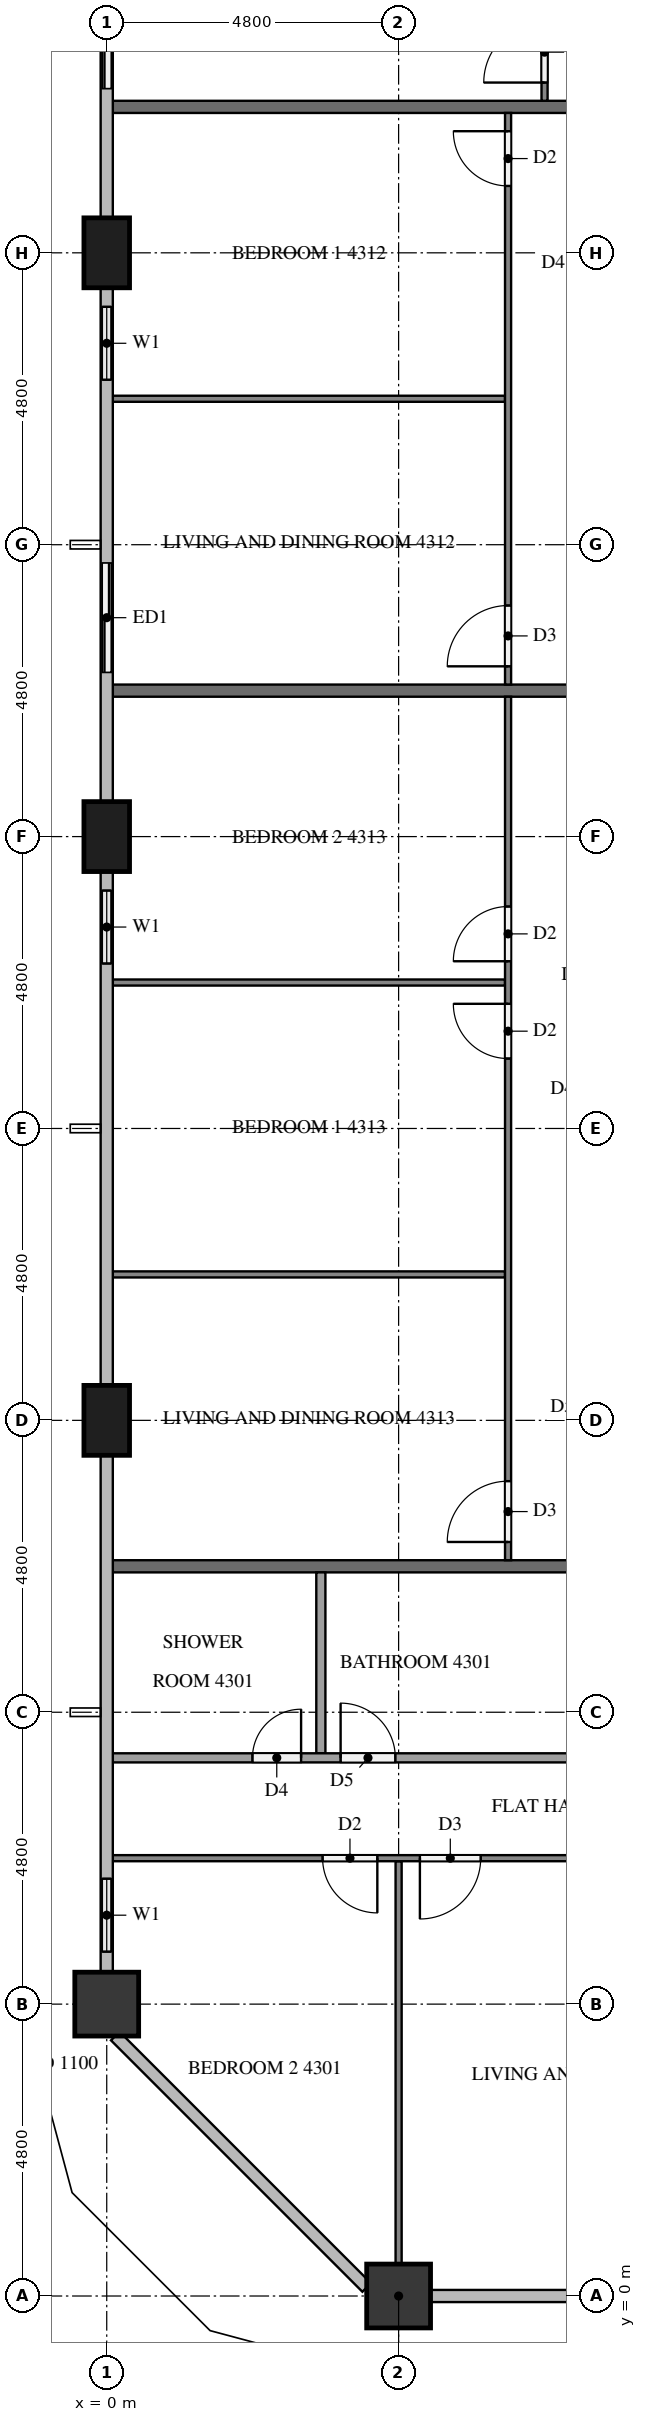
"""IFC4 building model, lengths in metres.
Left out: names, types, materials, properties, quantities, classifications, styles, units other than length and angle.
Written with IfcOpenShell. Run it as: python <this file> out.ifc"""

import sys

from ifc_helpers import new_model, si_unit, direction, frame, frame_2d, origin, origin_2d, place, context, subcontext, project, spatial, rectangle, extrude, element, fill, save


model = new_model("IFC4")
c1 = context("Model", 3, precision=1e-05, world=origin(), true_north=direction((0.0, 1.0)))
c2 = subcontext(c1, "Body", "Model", "MODEL_VIEW")
j1 = project(units=[si_unit("LENGTHUNIT", "METRE"), si_unit("PLANEANGLEUNIT", "RADIAN")], contexts=[c1])
p1 = place(None, origin())
s1 = spatial("IfcSite", under=j1, at=p1, CompositionType="ELEMENT")
p2 = place(p1, origin())
s2 = spatial("IfcBuilding", under=s1, at=p2, CompositionType="ELEMENT")
p3 = place(p2, frame((0.0, 0.0, 166.5)))
s3 = spatial("IfcBuildingStorey", under=s2, at=p3, CompositionType="ELEMENT", Elevation=166.5)
p4 = place(p3, frame((4.8, 0.0, 0.0), z_axis=(0.0, 0.0, 1.0), x_axis=(1.0, 0.0, 0.0)))
e1 = element("IfcColumn", 1, at=p4, inside=s3, PredefinedType="COLUMN", context=c2, shape_type="SweptSolid", body=[
    extrude(rectangle(XDim=1.05, YDim=1.05, at=origin_2d()), origin(), (0.0, 0.0, 1.0), 3.2),
])
for number, where, z_axis, x_axis in (
    (2, (0.0, 33.6, 0.0), (0.0, 0.0, 1.0), (0.0, 1.0, 0.0)),
    (3, (0.0, 24.0, 0.0), (0.0, 0.0, 1.0), (0.0, 1.0, 0.0)),
    (4, (0.0, 14.4, 0.0), (0.0, 0.0, 1.0), (0.0, 1.0, 0.0)),
):
    element("IfcColumn", number, at=place(p3, frame(where, z_axis=z_axis, x_axis=x_axis)), inside=s3, PredefinedType="COLUMN", context=c2, shape_type="SweptSolid", body=[
        extrude(rectangle(XDim=1.15, YDim=0.75, at=origin_2d()), origin(), (0.0, 0.0, 1.0), 3.2),
    ])
p5 = place(p3, frame((0.0, 4.8, 0.0), z_axis=(0.0, 0.0, 1.0), x_axis=(1.0, 0.0, 0.0)))
e5 = element("IfcColumn", 5, at=p5, inside=s3, PredefinedType="COLUMN", context=c2, shape_type="SweptSolid", body=[
    extrude(rectangle(XDim=1.05, YDim=1.05, at=origin_2d()), origin(), (0.0, 0.0, 1.0), 3.2),
])
p6 = place(p3, frame((0.0, 38.4, 0.0), z_axis=(0.0, 0.0, 1.0), x_axis=(0.0, -1.0, 0.0)))
e6 = element("IfcWall", 6, at=p6, inside=s3, PredefinedType="SOLIDWALL", context=c2, shape_type="SweptSolid", body=[
    extrude(rectangle(XDim=2.4, YDim=0.15, at=frame_2d((1.2, 0.0))), origin(), (0.0, 0.0, 1.0), 3.2),
])
p7 = place(p6, frame((0.3, 0.0, 0.0)))
e7 = element("IfcOpeningElement", 7, at=p7, cuts=e6, PredefinedType="OPENING", context=c2, shape_type="SweptSolid", body=[
    extrude(rectangle(XDim=1.8, YDim=2.4, at=frame_2d((0.9, 1.2))), frame((0.0, 0.085, 0.0), z_axis=(0.0, -1.0, 0.0), x_axis=(1.0, 0.0, 0.0)), (0.0, 0.0, 1.0), 0.17),
])
p8 = place(p3, frame((0.0, 33.025, 0.0), z_axis=(0.0, 0.0, 1.0), x_axis=(0.0, -1.0, 0.0)))
e8 = element("IfcWall", 8, at=p8, inside=s3, PredefinedType="SOLIDWALL", context=c2, shape_type="SweptSolid", body=[
    extrude(rectangle(XDim=1.825, YDim=0.15, at=frame_2d((0.913, 0.0))), origin(), (0.0, 0.0, 1.0), 3.2),
])
p9 = place(p8, frame((0.312, 0.0, 0.9)))
e9 = element("IfcOpeningElement", 9, at=p9, cuts=e8, PredefinedType="OPENING", context=c2, shape_type="SweptSolid", body=[
    extrude(rectangle(XDim=1.2, YDim=1.4, at=frame_2d((0.6, 0.7))), frame((0.0, 0.085, 0.0), z_axis=(0.0, -1.0, 0.0), x_axis=(1.0, 0.0, 0.0)), (0.0, 0.0, 1.0), 0.17),
])
p10 = place(p3, frame((0.0, 28.8, 0.0), z_axis=(0.0, 0.0, 1.0), x_axis=(0.0, -1.0, 0.0)))
e10 = element("IfcWall", 10, at=p10, inside=s3, PredefinedType="SOLIDWALL", context=c2, shape_type="SweptSolid", body=[
    extrude(rectangle(XDim=2.4, YDim=0.15, at=frame_2d((1.2, 0.0))), origin(), (0.0, 0.0, 1.0), 3.2),
])
p11 = place(p10, frame((0.3, 0.0, 0.0)))
e11 = element("IfcOpeningElement", 11, at=p11, cuts=e10, PredefinedType="OPENING", context=c2, shape_type="SweptSolid", body=[
    extrude(rectangle(XDim=1.8, YDim=2.4, at=frame_2d((0.9, 1.2))), frame((0.0, 0.085, 0.0), z_axis=(0.0, -1.0, 0.0), x_axis=(1.0, 0.0, 0.0)), (0.0, 0.0, 1.0), 0.17),
])
p12 = place(p3, frame((0.0, 23.425, 0.0), z_axis=(0.0, 0.0, 1.0), x_axis=(0.0, -1.0, 0.0)))
e12 = element("IfcWall", 12, at=p12, inside=s3, PredefinedType="SOLIDWALL", context=c2, shape_type="SweptSolid", body=[
    extrude(rectangle(XDim=1.825, YDim=0.15, at=frame_2d((0.913, 0.0))), origin(), (0.0, 0.0, 1.0), 3.2),
])
p13 = place(p12, frame((0.312, 0.0, 0.9)))
e13 = element("IfcOpeningElement", 13, at=p13, cuts=e12, PredefinedType="OPENING", context=c2, shape_type="SweptSolid", body=[
    extrude(rectangle(XDim=1.2, YDim=1.4, at=frame_2d((0.6, 0.7))), frame((0.0, 0.085, 0.0), z_axis=(0.0, -1.0, 0.0), x_axis=(1.0, 0.0, 0.0)), (0.0, 0.0, 1.0), 0.17),
])
p14 = place(p3, frame((0.0, 7.2, 0.0), z_axis=(0.0, 0.0, 1.0), x_axis=(0.0, -1.0, 0.0)))
e14 = element("IfcWall", 14, at=p14, inside=s3, PredefinedType="SOLIDWALL", context=c2, shape_type="SweptSolid", body=[
    extrude(rectangle(XDim=1.875, YDim=0.15, at=frame_2d((0.938, 0.0))), origin(), (0.0, 0.0, 1.0), 3.2),
])
p15 = place(p14, frame((0.337, 0.0, 0.9)))
e15 = element("IfcOpeningElement", 15, at=p15, cuts=e14, PredefinedType="OPENING", context=c2, shape_type="SweptSolid", body=[
    extrude(rectangle(XDim=1.2, YDim=1.4, at=frame_2d((0.6, 0.7))), frame((0.0, 0.085, 0.0), z_axis=(0.0, -1.0, 0.0), x_axis=(1.0, 0.0, 0.0)), (0.0, 0.0, 1.0), 0.17),
])
for number, where, z_axis, x_axis in (
    (16, (0.1, 12.0, 0.0), (0.0, 0.0, 1.0), (1.0, 0.0, 0.0)),
    (17, (0.1, 36.0, 0.0), (0.0, 0.0, 1.0), (1.0, 0.0, 0.0)),
    (18, (0.1, 26.4, 0.0), (0.0, 0.0, 1.0), (1.0, 0.0, 0.0)),
):
    element("IfcWall", number, at=place(p3, frame(where, z_axis=z_axis, x_axis=x_axis)), inside=s3, PredefinedType="PARTITIONING", context=c2, shape_type="SweptSolid", body=[
        extrude(rectangle(XDim=11.8, YDim=0.2, at=frame_2d((5.9, 0.0))), origin(), (0.0, 0.0, 1.0), 3.2),
    ])
p16 = place(p3, frame((4.8, 7.15, 0.0), z_axis=(0.0, 0.0, 1.0), x_axis=(0.0, -1.0, 0.0)))
e19 = element("IfcWall", 19, at=p16, inside=s3, PredefinedType="PARTITIONING", context=c2, shape_type="SweptSolid", body=[
    extrude(rectangle(XDim=6.625, YDim=0.1, at=frame_2d((3.312, 0.0))), origin(), (0.0, 0.0, 1.0), 3.2),
])
p17 = place(p3, frame((16.7, 7.2, 0.0), z_axis=(0.0, 0.0, 1.0), x_axis=(-1.0, 0.0, 0.0)))
e20 = element("IfcWall", 20, at=p17, inside=s3, PredefinedType="PARTITIONING", context=c2, shape_type="SweptSolid", body=[
    extrude(rectangle(XDim=16.6, YDim=0.1, at=frame_2d((8.3, 0.0))), origin(), (0.0, 0.0, 1.0), 3.2),
])
p18 = place(p17, frame((0.3, 0.0, 0.0)))
e21 = element("IfcOpeningElement", 21, at=p18, cuts=e20, PredefinedType="OPENING", context=c2, shape_type="SweptSolid", body=[
    extrude(rectangle(XDim=0.9, YDim=2.1, at=frame_2d((0.45, 1.05))), frame((0.0, 0.06, 0.0), z_axis=(0.0, -1.0, 0.0), x_axis=(1.0, 0.0, 0.0)), (0.0, 0.0, 1.0), 0.12),
])
p19 = place(p17, frame((10.55, 0.0, 0.0)))
e22 = element("IfcOpeningElement", 22, at=p19, cuts=e20, PredefinedType="OPENING", context=c2, shape_type="SweptSolid", body=[
    extrude(rectangle(XDim=1.0, YDim=2.1, at=frame_2d((0.5, 1.05))), frame((0.0, 0.06, 0.0), z_axis=(0.0, -1.0, 0.0), x_axis=(1.0, 0.0, 0.0)), (0.0, 0.0, 1.0), 0.12),
])
p20 = place(p17, frame((12.25, 0.0, 0.0)))
e23 = element("IfcOpeningElement", 23, at=p20, cuts=e20, PredefinedType="OPENING", context=c2, shape_type="SweptSolid", body=[
    extrude(rectangle(XDim=0.9, YDim=2.1, at=frame_2d((0.45, 1.05))), frame((0.0, 0.06, 0.0), z_axis=(0.0, -1.0, 0.0), x_axis=(1.0, 0.0, 0.0)), (0.0, 0.0, 1.0), 0.12),
])
p21 = place(p3, frame((3.521, 11.9, 0.0), z_axis=(0.0, 0.0, 1.0), x_axis=(0.0, -1.0, 0.0)))
e24 = element("IfcWall", 24, at=p21, inside=s3, PredefinedType="PARTITIONING", context=c2, shape_type="SweptSolid", body=[
    extrude(rectangle(XDim=2.975, YDim=0.15, at=frame_2d((1.487, 0.0))), origin(), (0.0, 0.0, 1.0), 3.2),
])
p22 = place(p3, frame((0.1, 8.85, 0.0), z_axis=(0.0, 0.0, 1.0), x_axis=(1.0, 0.0, 0.0)))
e25 = element("IfcWall", 25, at=p22, inside=s3, PredefinedType="PARTITIONING", context=c2, shape_type="SweptSolid", body=[
    extrude(rectangle(XDim=14.825, YDim=0.15, at=frame_2d((7.413, 0.0))), origin(), (0.0, 0.0, 1.0), 3.2),
])
p23 = place(p22, frame((13.625, 0.0, 0.0)))
e26 = element("IfcOpeningElement", 26, at=p23, cuts=e25, PredefinedType="OPENING", context=c2, shape_type="SweptSolid", body=[
    extrude(rectangle(XDim=0.9, YDim=2.1, at=frame_2d((0.45, 1.05))), frame((0.0, 0.085, 0.0), z_axis=(0.0, -1.0, 0.0), x_axis=(1.0, 0.0, 0.0)), (0.0, 0.0, 1.0), 0.17),
])
p24 = place(p22, frame((3.746, 0.0, 0.0)))
e27 = element("IfcOpeningElement", 27, at=p24, cuts=e25, PredefinedType="OPENING", context=c2, shape_type="SweptSolid", body=[
    extrude(rectangle(XDim=0.9, YDim=2.1, at=frame_2d((0.45, 1.05))), frame((0.0, 0.085, 0.0), z_axis=(0.0, -1.0, 0.0), x_axis=(1.0, 0.0, 0.0)), (0.0, 0.0, 1.0), 0.17),
])
p25 = place(p22, frame((2.296, 0.0, 0.0)))
e28 = element("IfcOpeningElement", 28, at=p25, cuts=e25, PredefinedType="OPENING", context=c2, shape_type="SweptSolid", body=[
    extrude(rectangle(XDim=0.8, YDim=2.1, at=frame_2d((0.4, 1.05))), frame((0.0, 0.085, 0.0), z_axis=(0.0, -1.0, 0.0), x_axis=(1.0, 0.0, 0.0)), (0.0, 0.0, 1.0), 0.17),
])
p26 = place(p3, frame((7.2, 36.1, 0.0), z_axis=(0.0, 0.0, 1.0), x_axis=(0.0, 1.0, 0.0)))
e29 = element("IfcWall", 29, at=p26, inside=s3, PredefinedType="PARTITIONING", context=c2, shape_type="SweptSolid", body=[
    extrude(rectangle(XDim=11.8, YDim=0.1, at=frame_2d((5.9, 0.0))), origin(), (0.0, 0.0, 1.0), 3.2),
])
p27 = place(p26, frame((0.3, 0.0, 0.0)))
e30 = element("IfcOpeningElement", 30, at=p27, cuts=e29, PredefinedType="OPENING", context=c2, shape_type="SweptSolid", body=[
    extrude(rectangle(XDim=1.0, YDim=2.1, at=frame_2d((0.5, 1.05))), frame((0.0, 0.06, 0.0), z_axis=(0.0, -1.0, 0.0), x_axis=(1.0, 0.0, 0.0)), (0.0, 0.0, 1.0), 0.12),
])
p28 = place(p26, frame((10.6, 0.0, 0.0)))
e31 = element("IfcOpeningElement", 31, at=p28, cuts=e29, PredefinedType="OPENING", context=c2, shape_type="SweptSolid", body=[
    extrude(rectangle(XDim=0.9, YDim=2.1, at=frame_2d((0.45, 1.05))), frame((0.0, 0.06, 0.0), z_axis=(0.0, -1.0, 0.0), x_axis=(1.0, 0.0, 0.0)), (0.0, 0.0, 1.0), 0.12),
])
p29 = place(p3, frame((6.55, 31.2, 0.0), z_axis=(0.0, 0.0, 1.0), x_axis=(-1.0, 0.0, 0.0)))
e32 = element("IfcWall", 32, at=p29, inside=s3, PredefinedType="PARTITIONING", context=c2, shape_type="SweptSolid", body=[
    extrude(rectangle(XDim=6.45, YDim=0.1, at=frame_2d((3.225, 0.0))), origin(), (0.0, 0.0, 1.0), 3.2),
])
p30 = place(p3, frame((6.6, 26.5, 0.0), z_axis=(0.0, 0.0, 1.0), x_axis=(0.0, 1.0, 0.0)))
e33 = element("IfcWall", 33, at=p30, inside=s3, PredefinedType="PARTITIONING", context=c2, shape_type="SweptSolid", body=[
    extrude(rectangle(XDim=9.4, YDim=0.1, at=frame_2d((4.7, 0.0))), origin(), (0.0, 0.0, 1.0), 3.2),
])
p31 = place(p30, frame((8.2, 0.0, 0.0)))
e34 = element("IfcOpeningElement", 34, at=p31, cuts=e33, PredefinedType="OPENING", context=c2, shape_type="SweptSolid", body=[
    extrude(rectangle(XDim=0.9, YDim=2.1, at=frame_2d((0.45, 1.05))), frame((0.0, 0.06, 0.0), z_axis=(0.0, -1.0, 0.0), x_axis=(1.0, 0.0, 0.0)), (0.0, 0.0, 1.0), 0.12),
])
p32 = place(p30, frame((0.3, 0.0, 0.0)))
e35 = element("IfcOpeningElement", 35, at=p32, cuts=e33, PredefinedType="OPENING", context=c2, shape_type="SweptSolid", body=[
    extrude(rectangle(XDim=1.0, YDim=2.1, at=frame_2d((0.5, 1.05))), frame((0.0, 0.06, 0.0), z_axis=(0.0, -1.0, 0.0), x_axis=(1.0, 0.0, 0.0)), (0.0, 0.0, 1.0), 0.12),
])
for number, where, z_axis, x_axis in (
    (36, (6.55, 16.8, 0.0), (0.0, 0.0, 1.0), (-1.0, 0.0, 0.0)),
    (37, (6.55, 21.6, 0.0), (0.0, 0.0, 1.0), (-1.0, 0.0, 0.0)),
):
    element("IfcWall", number, at=place(p3, frame(where, z_axis=z_axis, x_axis=x_axis)), inside=s3, PredefinedType="PARTITIONING", context=c2, shape_type="SweptSolid", body=[
        extrude(rectangle(XDim=6.45, YDim=0.1, at=frame_2d((3.225, 0.0))), origin(), (0.0, 0.0, 1.0), 3.2),
    ])
p33 = place(p3, frame((6.6, 12.1, 0.0), z_axis=(0.0, 0.0, 1.0), x_axis=(0.0, 1.0, 0.0)))
e38 = element("IfcWall", 38, at=p33, inside=s3, PredefinedType="PARTITIONING", context=c2, shape_type="SweptSolid", body=[
    extrude(rectangle(XDim=14.2, YDim=0.1, at=frame_2d((7.1, 0.0))), origin(), (0.0, 0.0, 1.0), 3.2),
])
p34 = place(p33, frame((0.3, 0.0, 0.0)))
e39 = element("IfcOpeningElement", 39, at=p34, cuts=e38, PredefinedType="OPENING", context=c2, shape_type="SweptSolid", body=[
    extrude(rectangle(XDim=1.0, YDim=2.1, at=frame_2d((0.5, 1.05))), frame((0.0, 0.06, 0.0), z_axis=(0.0, -1.0, 0.0), x_axis=(1.0, 0.0, 0.0)), (0.0, 0.0, 1.0), 0.12),
])
p35 = place(p33, frame((8.25, 0.0, 0.0)))
e40 = element("IfcOpeningElement", 40, at=p35, cuts=e38, PredefinedType="OPENING", context=c2, shape_type="SweptSolid", body=[
    extrude(rectangle(XDim=0.9, YDim=2.1, at=frame_2d((0.45, 1.05))), frame((0.0, 0.06, 0.0), z_axis=(0.0, -1.0, 0.0), x_axis=(1.0, 0.0, 0.0)), (0.0, 0.0, 1.0), 0.12),
])
p36 = place(p33, frame((9.85, 0.0, 0.0)))
e41 = element("IfcOpeningElement", 41, at=p36, cuts=e38, PredefinedType="OPENING", context=c2, shape_type="SweptSolid", body=[
    extrude(rectangle(XDim=0.9, YDim=2.1, at=frame_2d((0.45, 1.05))), frame((0.0, 0.06, 0.0), z_axis=(0.0, -1.0, 0.0), x_axis=(1.0, 0.0, 0.0)), (0.0, 0.0, 1.0), 0.12),
])
p37 = place(p7, origin())
e42 = element("IfcDoor", 42, at=p37, inside=s3, OperationType="SLIDING_TO_LEFT", PredefinedType="DOOR", context=c2, shape_type="SweptSolid", body=[
    extrude(rectangle(XDim=1.8, YDim=2.4, at=frame_2d((0.9, 1.2))), frame((0.0, 0.025, 0.0), z_axis=(0.0, -1.0, 0.0), x_axis=(1.0, 0.0, 0.0)), (0.0, 0.0, 1.0), 0.05),
])
fill(e7, e42)
p38 = place(p9, origin())
e43 = element("IfcWindow", 43, at=p38, inside=s3, PartitioningType="SINGLE_PANEL", PredefinedType="WINDOW", context=c2, shape_type="SweptSolid", body=[
    extrude(rectangle(XDim=1.2, YDim=1.4, at=frame_2d((0.6, 0.7))), frame((0.0, 0.03, 0.0), z_axis=(0.0, -1.0, 0.0), x_axis=(1.0, 0.0, 0.0)), (0.0, 0.0, 1.0), 0.06),
])
fill(e9, e43)
p39 = place(p11, origin())
e44 = element("IfcDoor", 44, at=p39, inside=s3, OperationType="SLIDING_TO_RIGHT", PredefinedType="DOOR", context=c2, shape_type="SweptSolid", body=[
    extrude(rectangle(XDim=1.8, YDim=2.4, at=frame_2d((0.9, 1.2))), frame((0.0, 0.025, 0.0), z_axis=(0.0, -1.0, 0.0), x_axis=(1.0, 0.0, 0.0)), (0.0, 0.0, 1.0), 0.05),
])
fill(e11, e44)
p40 = place(p13, origin())
e45 = element("IfcWindow", 45, at=p40, inside=s3, PartitioningType="SINGLE_PANEL", PredefinedType="WINDOW", context=c2, shape_type="SweptSolid", body=[
    extrude(rectangle(XDim=1.2, YDim=1.4, at=frame_2d((0.6, 0.7))), frame((0.0, 0.03, 0.0), z_axis=(0.0, -1.0, 0.0), x_axis=(1.0, 0.0, 0.0)), (0.0, 0.0, 1.0), 0.06),
])
fill(e13, e45)
p41 = place(p15, origin())
e46 = element("IfcWindow", 46, at=p41, inside=s3, PartitioningType="SINGLE_PANEL", PredefinedType="WINDOW", context=c2, shape_type="SweptSolid", body=[
    extrude(rectangle(XDim=1.2, YDim=1.4, at=frame_2d((0.6, 0.7))), frame((0.0, 0.03, 0.0), z_axis=(0.0, -1.0, 0.0), x_axis=(1.0, 0.0, 0.0)), (0.0, 0.0, 1.0), 0.06),
])
fill(e15, e46)
p42 = place(p19, origin())
e47 = element("IfcDoor", 47, at=p42, inside=s3, OperationType="SINGLE_SWING_RIGHT", PredefinedType="DOOR", context=c2, shape_type="SweptSolid", body=[
    extrude(rectangle(XDim=1.0, YDim=2.1, at=frame_2d((0.5, 1.05))), frame((0.0, 0.025, 0.0), z_axis=(0.0, -1.0, 0.0), x_axis=(1.0, 0.0, 0.0)), (0.0, 0.0, 1.0), 0.05),
])
fill(e22, e47)
p43 = place(p20, origin())
e48 = element("IfcDoor", 48, at=p43, inside=s3, OperationType="SINGLE_SWING_LEFT", PredefinedType="DOOR", context=c2, shape_type="SweptSolid", body=[
    extrude(rectangle(XDim=0.9, YDim=2.1, at=frame_2d((0.45, 1.05))), frame((0.0, 0.025, 0.0), z_axis=(0.0, -1.0, 0.0), x_axis=(1.0, 0.0, 0.0)), (0.0, 0.0, 1.0), 0.05),
])
fill(e23, e48)
p44 = place(p24, origin())
e49 = element("IfcDoor", 49, at=p44, inside=s3, OperationType="SINGLE_SWING_LEFT", PredefinedType="DOOR", context=c2, shape_type="SweptSolid", body=[
    extrude(rectangle(XDim=0.9, YDim=2.1, at=frame_2d((0.45, 1.05))), frame((0.0, 0.025, 0.0), z_axis=(0.0, -1.0, 0.0), x_axis=(1.0, 0.0, 0.0)), (0.0, 0.0, 1.0), 0.05),
])
fill(e27, e49)
p45 = place(p25, origin())
e50 = element("IfcDoor", 50, at=p45, inside=s3, OperationType="SINGLE_SWING_RIGHT", PredefinedType="DOOR", context=c2, shape_type="SweptSolid", body=[
    extrude(rectangle(XDim=0.8, YDim=2.1, at=frame_2d((0.4, 1.05))), frame((0.0, 0.025, 0.0), z_axis=(0.0, -1.0, 0.0), x_axis=(1.0, 0.0, 0.0)), (0.0, 0.0, 1.0), 0.05),
])
fill(e28, e50)
p46 = place(p27, origin())
e51 = element("IfcDoor", 51, at=p46, inside=s3, OperationType="SINGLE_SWING_LEFT", PredefinedType="DOOR", context=c2, shape_type="SweptSolid", body=[
    extrude(rectangle(XDim=1.0, YDim=2.1, at=frame_2d((0.5, 1.05))), frame((0.0, 0.025, 0.0), z_axis=(0.0, -1.0, 0.0), x_axis=(1.0, 0.0, 0.0)), (0.0, 0.0, 1.0), 0.05),
])
fill(e30, e51)
p47 = place(p31, origin())
e52 = element("IfcDoor", 52, at=p47, inside=s3, OperationType="SINGLE_SWING_RIGHT", PredefinedType="DOOR", context=c2, shape_type="SweptSolid", body=[
    extrude(rectangle(XDim=0.9, YDim=2.1, at=frame_2d((0.45, 1.05))), frame((0.0, 0.025, 0.0), z_axis=(0.0, -1.0, 0.0), x_axis=(1.0, 0.0, 0.0)), (0.0, 0.0, 1.0), 0.05),
])
fill(e34, e52)
p48 = place(p32, origin())
e53 = element("IfcDoor", 53, at=p48, inside=s3, OperationType="SINGLE_SWING_LEFT", PredefinedType="DOOR", context=c2, shape_type="SweptSolid", body=[
    extrude(rectangle(XDim=1.0, YDim=2.1, at=frame_2d((0.5, 1.05))), frame((0.0, 0.025, 0.0), z_axis=(0.0, -1.0, 0.0), x_axis=(1.0, 0.0, 0.0)), (0.0, 0.0, 1.0), 0.05),
])
fill(e35, e53)
p49 = place(p34, origin())
e54 = element("IfcDoor", 54, at=p49, inside=s3, OperationType="SINGLE_SWING_LEFT", PredefinedType="DOOR", context=c2, shape_type="SweptSolid", body=[
    extrude(rectangle(XDim=1.0, YDim=2.1, at=frame_2d((0.5, 1.05))), frame((0.0, 0.025, 0.0), z_axis=(0.0, -1.0, 0.0), x_axis=(1.0, 0.0, 0.0)), (0.0, 0.0, 1.0), 0.05),
])
fill(e39, e54)
p50 = place(p35, origin())
e55 = element("IfcDoor", 55, at=p50, inside=s3, OperationType="SINGLE_SWING_RIGHT", PredefinedType="DOOR", context=c2, shape_type="SweptSolid", body=[
    extrude(rectangle(XDim=0.9, YDim=2.1, at=frame_2d((0.45, 1.05))), frame((0.0, 0.025, 0.0), z_axis=(0.0, -1.0, 0.0), x_axis=(1.0, 0.0, 0.0)), (0.0, 0.0, 1.0), 0.05),
])
fill(e40, e55)
p51 = place(p36, origin())
e56 = element("IfcDoor", 56, at=p51, inside=s3, OperationType="SINGLE_SWING_LEFT", PredefinedType="DOOR", context=c2, shape_type="SweptSolid", body=[
    extrude(rectangle(XDim=0.9, YDim=2.1, at=frame_2d((0.45, 1.05))), frame((0.0, 0.025, 0.0), z_axis=(0.0, -1.0, 0.0), x_axis=(1.0, 0.0, 0.0)), (0.0, 0.0, 1.0), 0.05),
])
fill(e41, e56)
save(model, sys.argv[1])
